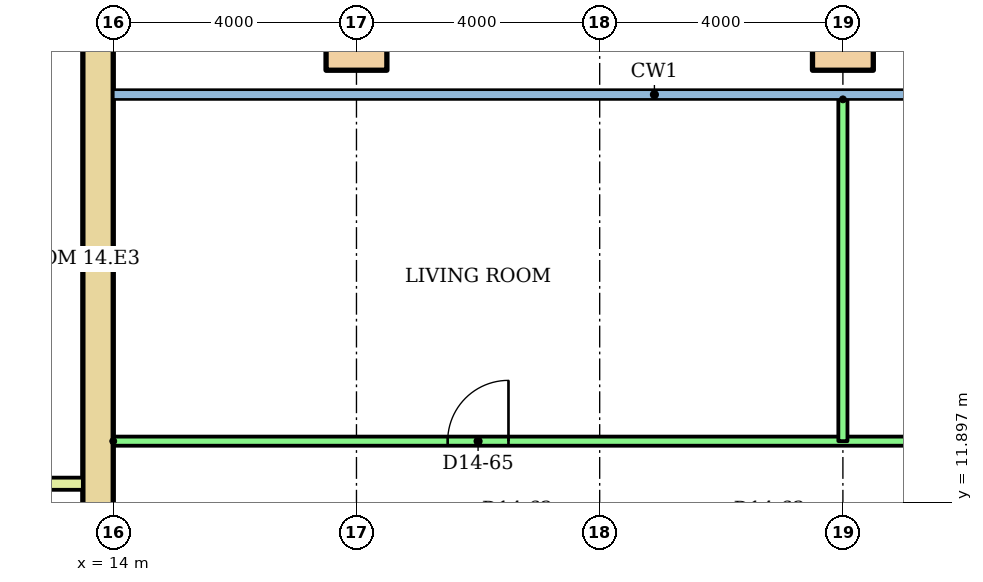
"""IFC4 building model, lengths in metres.
Left out: names, types, materials, properties, quantities, classifications, styles, units other than length and angle.
Written with IfcOpenShell. Run it as: python <this file> out.ifc"""

import sys

from ifc_helpers import new_model, si_unit, direction, frame, frame_2d, origin, origin_2d, place, context, subcontext, project, spatial, rectangle, hollow_rectangle, extrude, element, fill, save


model = new_model("IFC4")
c1 = context("Model", 3, precision=1e-05, world=origin(), true_north=direction((0.0, 1.0)))
c2 = subcontext(c1, "Body", "Model", "MODEL_VIEW")
j1 = project(units=[si_unit("LENGTHUNIT", "METRE"), si_unit("PLANEANGLEUNIT", "RADIAN")], contexts=[c1])
p1 = place(None, origin())
s1 = spatial("IfcSite", under=j1, at=p1, CompositionType="ELEMENT")
p2 = place(p1, origin())
s2 = spatial("IfcBuilding", under=s1, at=p2, CompositionType="ELEMENT")
p3 = place(p2, frame((0.0, 0.0, 54.4)))
s3 = spatial("IfcBuildingStorey", under=s2, at=p3, CompositionType="ELEMENT", Elevation=54.4)
for number, where in (
    (1, (18.0, 19.5, 0.0)),
    (2, (26.0, 19.5, 0.0)),
):
    element("IfcColumn", number, at=place(p3, frame(where)), inside=s3, PredefinedType="COLUMN", context=c2, shape_type="SweptSolid", body=[
        extrude(hollow_rectangle(XDim=1.0, YDim=1.0, WallThickness=0.05, at=origin_2d()), origin(), (0.0, 0.0, 1.0), 3.2),
    ])
p4 = place(p3, frame((13.75, 3.0, 0.0), z_axis=(0.0, 0.0, 1.0), x_axis=(0.0, 1.0, 0.0)))
e3 = element("IfcWall", 3, at=p4, inside=s3, PredefinedType="SHEAR", context=c2, shape_type="SweptSolid", body=[
    extrude(rectangle(XDim=17.0, YDim=0.5, at=frame_2d((8.5, 0.0))), origin(), (0.0, 0.0, 1.0), 2.92),
])
p5 = place(p3, frame((9.6, 12.2, 0.0)))
e4 = element("IfcWall", 4, at=p5, inside=s3, PredefinedType="PARTITIONING", context=c2, shape_type="SweptSolid", body=[
    extrude(rectangle(XDim=3.9, YDim=0.2, at=frame_2d((1.95, 0.0))), origin(), (0.0, 0.0, 1.0), 2.92),
])
p6 = place(p3, frame((14.0, 12.9, 0.0)))
e5 = element("IfcWall", 5, at=p6, inside=s3, PredefinedType="PARTITIONING", context=c2, shape_type="SweptSolid", body=[
    extrude(rectangle(XDim=22.52, YDim=0.15, at=frame_2d((11.26, 0.0))), origin(), (0.0, 0.0, 1.0), 2.4),
])
p7 = place(p6, frame((5.5, 0.0, 0.0)))
e6 = element("IfcOpeningElement", 6, at=p7, cuts=e5, PredefinedType="OPENING", context=c2, shape_type="SweptSolid", body=[
    extrude(rectangle(XDim=1.0, YDim=2.1, at=frame_2d((0.5, 1.05))), frame((0.0, 0.085, 0.0), z_axis=(0.0, -1.0, 0.0), x_axis=(1.0, 0.0, 0.0)), (0.0, 0.0, 1.0), 0.17),
])
p8 = place(p6, frame((14.45, 0.0, 0.0)))
e7 = element("IfcOpeningElement", 7, at=p8, cuts=e5, PredefinedType="OPENING", context=c2, shape_type="SweptSolid", body=[
    extrude(rectangle(XDim=0.9, YDim=2.1, at=frame_2d((0.45, 1.05))), frame((0.0, 0.085, 0.0), z_axis=(0.0, -1.0, 0.0), x_axis=(1.0, 0.0, 0.0)), (0.0, 0.0, 1.0), 0.17),
])
p9 = place(p6, frame((20.76, 0.0, 0.0)))
e8 = element("IfcOpeningElement", 8, at=p9, cuts=e5, PredefinedType="OPENING", context=c2, shape_type="SweptSolid", body=[
    extrude(rectangle(XDim=0.9, YDim=2.1, at=frame_2d((0.45, 1.05))), frame((0.0, 0.085, 0.0), z_axis=(0.0, -1.0, 0.0), x_axis=(1.0, 0.0, 0.0)), (0.0, 0.0, 1.0), 0.17),
])
p10 = place(p3, frame((26.0, 18.521, 0.0), z_axis=(0.0, 0.0, 1.0), x_axis=(0.0, -1.0, 0.0)))
e9 = element("IfcWall", 9, at=p10, inside=s3, PredefinedType="PARTITIONING", context=c2, shape_type="SweptSolid", body=[
    extrude(rectangle(XDim=5.621, YDim=0.15, at=frame_2d((2.811, 0.0))), origin(), (0.0, 0.0, 1.0), 2.4),
])
p11 = place(p7, origin())
e10 = element("IfcDoor", 10, at=p11, inside=s3, OperationType="SINGLE_SWING_RIGHT", PredefinedType="DOOR", context=c2, shape_type="SweptSolid", body=[
    extrude(rectangle(XDim=1.0, YDim=2.1, at=frame_2d((0.5, 1.05))), frame((0.0, 0.025, 0.0), z_axis=(0.0, -1.0, 0.0), x_axis=(1.0, 0.0, 0.0)), (0.0, 0.0, 1.0), 0.05),
])
fill(e6, e10)
save(model, sys.argv[1])
